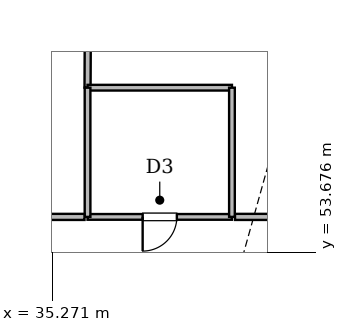
"""IFC4 building model, lengths in metres.
Left out: names, types, materials, properties, quantities, classifications, styles, units other than length and angle.
Written with IfcOpenShell. Run it as: python <this file> out.ifc"""

import sys

from ifc_helpers import new_model, si_unit, direction, frame, frame_2d, origin, place, context, subcontext, project, spatial, rectangle, extrude, element, fill, save


model = new_model("IFC4")
c1 = context("Model", 3, precision=1e-05, world=origin(), true_north=direction((0.0, 1.0)))
c2 = subcontext(c1, "Body", "Model", "MODEL_VIEW")
j1 = project(units=[si_unit("LENGTHUNIT", "METRE"), si_unit("PLANEANGLEUNIT", "RADIAN")], contexts=[c1])
p1 = place(None, origin())
s1 = spatial("IfcSite", under=j1, at=p1, CompositionType="ELEMENT")
p2 = place(p1, origin())
s2 = spatial("IfcBuilding", under=s1, at=p2, CompositionType="ELEMENT")
p3 = place(p2, frame((0.0, 0.0, 4.8)))
s3 = spatial("IfcBuildingStorey", under=s2, at=p3, CompositionType="ELEMENT", Elevation=4.8)
p4 = place(p3, frame((52.47, 54.6, 0.0), z_axis=(0.0, 0.0, 1.0), x_axis=(-1.0, 0.0, 0.0)))
e1 = element("IfcWall", 1, at=p4, inside=s3, PredefinedType="SOLIDWALL", context=c2, shape_type="SweptSolid", body=[
    extrude(rectangle(XDim=12.39, YDim=0.16, at=frame_2d((6.195, 0.0))), origin(), (0.0, 0.0, 1.0), 4.0),
])
p5 = place(p4, frame((5.645, 0.0, 0.0)))
e2 = element("IfcOpeningElement", 2, at=p5, cuts=e1, PredefinedType="OPENING", context=c2, shape_type="SweptSolid", body=[
    extrude(rectangle(XDim=1.1, YDim=2.15, at=frame_2d((0.55, 1.075))), frame((0.0, 0.09, 0.0), z_axis=(0.0, -1.0, 0.0), x_axis=(1.0, 0.0, 0.0)), (0.0, 0.0, 1.0), 0.18),
])
p6 = place(p3, frame((40.0, 54.6, 0.0), z_axis=(0.0, 0.0, 1.0), x_axis=(-1.0, 0.0, 0.0)))
e3 = element("IfcWall", 3, at=p6, inside=s3, PredefinedType="PLUMBINGWALL", context=c2, shape_type="SweptSolid", body=[
    extrude(rectangle(XDim=3.8, YDim=0.15, at=frame_2d((1.9, 0.0))), origin(), (0.0, 0.0, 1.0), 4.0),
])
p7 = place(p6, frame((1.45, 0.0, 0.0)))
e4 = element("IfcOpeningElement", 4, at=p7, cuts=e3, PredefinedType="OPENING", context=c2, shape_type="SweptSolid", body=[
    extrude(rectangle(XDim=0.9, YDim=2.1, at=frame_2d((0.45, 1.05))), frame((0.0, 0.085, 0.0), z_axis=(0.0, -1.0, 0.0), x_axis=(1.0, 0.0, 0.0)), (0.0, 0.0, 1.0), 0.17),
])
p8 = place(p3, frame((36.2, 58.0, 0.0), z_axis=(0.0, 0.0, 1.0), x_axis=(0.0047276738, 0.999988824488, 0.0)))
e5 = element("IfcWall", 5, at=p8, inside=s3, PredefinedType="SOLIDWALL", context=c2, shape_type="SweptSolid", body=[
    extrude(rectangle(XDim=15.647, YDim=0.16, at=frame_2d((7.824, 0.0))), origin(), (0.0, 0.0, 1.0), 3.788),
])
p9 = place(p3, frame((40.0, 58.0, 0.0), z_axis=(0.0, 0.0, 1.0), x_axis=(-1.0, 0.0, 0.0)))
e6 = element("IfcWall", 6, at=p9, inside=s3, PredefinedType="PLUMBINGWALL", context=c2, shape_type="SweptSolid", body=[
    extrude(rectangle(XDim=3.8, YDim=0.15, at=frame_2d((1.9, 0.0))), origin(), (0.0, 0.0, 1.0), 4.5),
])
p10 = place(p3, frame((36.2, 58.0, 0.0), z_axis=(0.0, 0.0, 1.0), x_axis=(0.0, -1.0, 0.0)))
e7 = element("IfcWall", 7, at=p10, inside=s3, PredefinedType="PLUMBINGWALL", context=c2, shape_type="SweptSolid", body=[
    extrude(rectangle(XDim=3.4, YDim=0.15, at=frame_2d((1.7, 0.0))), origin(), (0.0, 0.0, 1.0), 4.5),
])
p11 = place(p3, frame((40.0, 54.6, 0.0), z_axis=(0.0, 0.0, 1.0), x_axis=(0.0, 1.0, 0.0)))
e8 = element("IfcWall", 8, at=p11, inside=s3, PredefinedType="PLUMBINGWALL", context=c2, shape_type="SweptSolid", body=[
    extrude(rectangle(XDim=3.4, YDim=0.15, at=frame_2d((1.7, 0.0))), origin(), (0.0, 0.0, 1.0), 4.0),
])
p12 = place(p3, frame((36.12, 54.6, 0.0), z_axis=(0.0, 0.0, 1.0), x_axis=(-1.0, 0.0, 0.0)))
e9 = element("IfcWall", 9, at=p12, inside=s3, PredefinedType="SOLIDWALL", context=c2, shape_type="SweptSolid", body=[
    extrude(rectangle(XDim=2.64, YDim=0.16, at=frame_2d((1.32, 0.0))), origin(), (0.0, 0.0, 1.0), 4.5),
])
p13 = place(p7, origin())
e10 = element("IfcDoor", 10, at=p13, inside=s3, OperationType="SINGLE_SWING_RIGHT", PredefinedType="DOOR", context=c2, shape_type="SweptSolid", body=[
    extrude(rectangle(XDim=0.9, YDim=2.1, at=frame_2d((0.45, 1.05))), frame((0.0, 0.025, 0.0), z_axis=(0.0, -1.0, 0.0), x_axis=(1.0, 0.0, 0.0)), (0.0, 0.0, 1.0), 0.05),
])
fill(e4, e10)
save(model, sys.argv[1])
